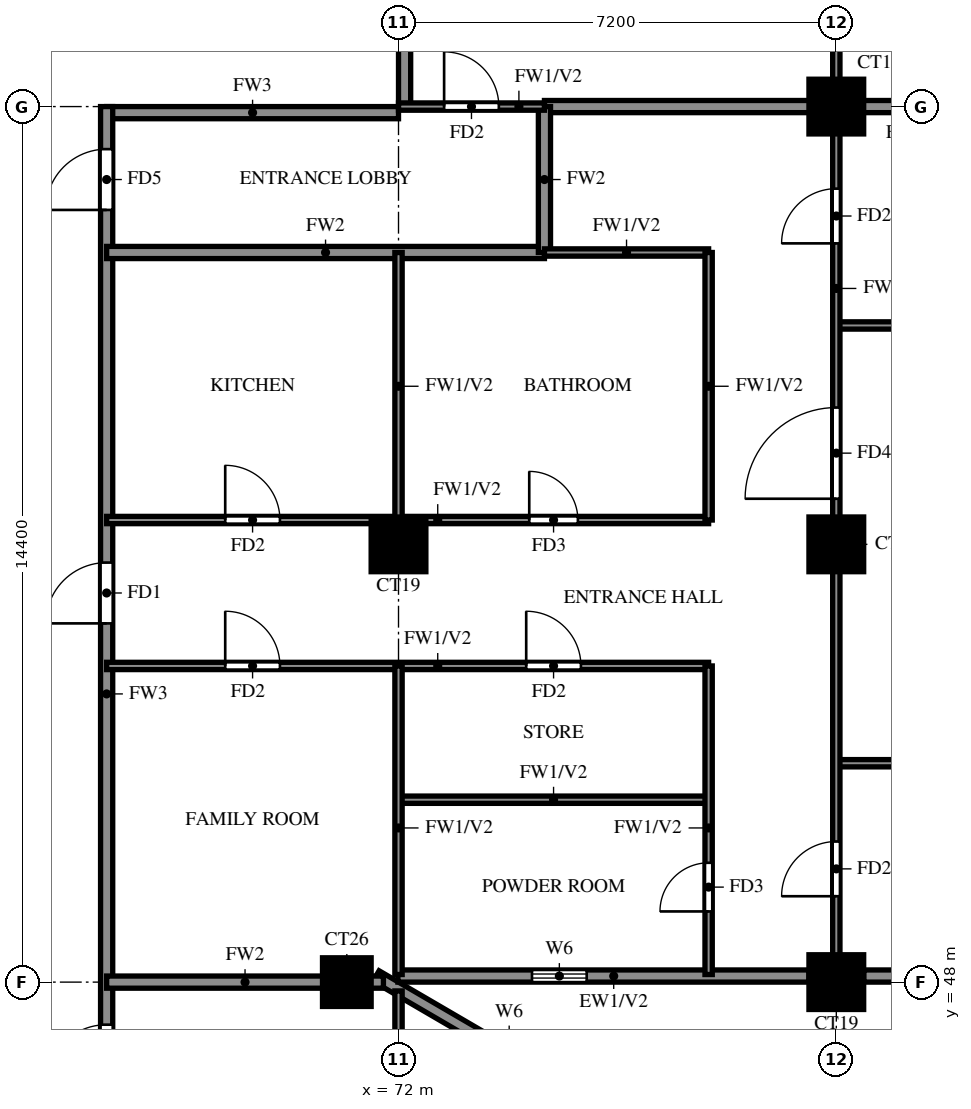
"""IFC4 building model, lengths in metres.
Left out: names, types, materials, properties, quantities, classifications, styles, units other than length and angle.
Written with IfcOpenShell. Run it as: python <this file> out.ifc"""

import sys

from ifc_helpers import new_model, si_unit, direction, frame, frame_2d, origin, origin_2d, place, context, subcontext, project, spatial, rectangle, extrude, source, transform, mapped, element, fill, save


model = new_model("IFC4")
c1 = context("Model", 3, precision=1e-05, world=origin(), true_north=direction((0.0, 1.0)))
c2 = subcontext(c1, "Body", "Model", "MODEL_VIEW")
j1 = project(units=[si_unit("LENGTHUNIT", "METRE"), si_unit("PLANEANGLEUNIT", "RADIAN")], contexts=[c1])
p1 = place(None, origin())
s1 = spatial("IfcSite", under=j1, at=p1, CompositionType="ELEMENT")
p2 = place(p1, origin())
s2 = spatial("IfcBuilding", under=s1, at=p2, CompositionType="ELEMENT")
p3 = place(p2, frame((0.0, 0.0, 192.0)))
s3 = spatial("IfcBuildingStorey", under=s2, at=p3, CompositionType="ELEMENT", Elevation=192.0)
m1 = source(origin(), c2, "Body", "SweptSolid", [
    extrude(rectangle(XDim=0.8, YDim=0.8, at=origin_2d()), origin(), (0.0, 0.0, 1.0), 3.2),
])
p4 = place(p3, frame((71.15, 48.0, 0.0), z_axis=(0.0, 0.0, 1.0), x_axis=(1.0, 0.0, 0.0)))
e1 = element("IfcColumn", 1, at=p4, inside=s3, PredefinedType="COLUMN", context=c2, shape_type="MappedRepresentation", body=[
    mapped(m1, transform((0.0, 0.0, 0.0))),
])
m2 = source(origin(), c2, "Body", "SweptSolid", [
    extrude(rectangle(XDim=0.9, YDim=0.9, at=origin_2d()), origin(), (0.0, 0.0, 1.0), 3.2),
])
for number, where, z_axis, x_axis in (
    (2, (79.2, 48.0, 0.0), (0.0, 0.0, 1.0), (1.0, 0.0, 0.0)),
    (3, (72.0, 55.2, 0.0), (0.0, 0.0, 1.0), (1.0, 0.0, 0.0)),
    (4, (79.2, 55.2, 0.0), (0.0, 0.0, 1.0), (1.0, 0.0, 0.0)),
    (5, (79.2, 62.4, 0.0), (0.0, 0.0, 1.0), (1.0, 0.0, 0.0)),
):
    element("IfcColumn", number, at=place(p3, frame(where, z_axis=z_axis, x_axis=x_axis)), inside=s3, PredefinedType="COLUMN", context=c2, shape_type="MappedRepresentation", body=[
        mapped(m2, transform((0.0, 0.0, 0.0))),
    ])
p5 = place(p3, frame((85.719, 39.881, 0.0), z_axis=(0.0, 0.0, 1.0), x_axis=(-0.86377618652, 0.503875678716, 0.0)))
e6 = element("IfcWall", 6, at=p5, inside=s3, PredefinedType="SOLIDWALL", context=c2, shape_type="SweptSolid", body=[
    extrude(rectangle(XDim=16.311, YDim=0.2, at=frame_2d((8.156, 0.0))), origin(), (0.0, 0.0, 1.0), 3.2),
])
p6 = place(p5, frame((13.326, 0.0, 1.5)))
e7 = element("IfcOpeningElement", 7, at=p6, cuts=e6, PredefinedType="OPENING", context=c2, shape_type="SweptSolid", body=[
    extrude(rectangle(XDim=0.9, YDim=0.9, at=frame_2d((0.45, 0.45))), frame((0.0, 0.11, 0.0), z_axis=(0.0, -1.0, 0.0), x_axis=(1.0, 0.0, 0.0)), (0.0, 0.0, 1.0), 0.22),
])
p7 = place(p3, frame((71.99, 48.1, 0.0), z_axis=(0.0, 0.0, 1.0), x_axis=(1.0, 0.0, 0.0)))
e8 = element("IfcWall", 8, at=p7, inside=s3, PredefinedType="SOLIDWALL", context=c2, shape_type="SweptSolid", body=[
    extrude(rectangle(XDim=6.76, YDim=0.2, at=frame_2d((3.38, 0.0))), origin(), (0.0, 0.0, 1.0), 3.2),
])
p8 = place(p7, frame((2.205, 0.0, 1.5)))
e9 = element("IfcOpeningElement", 9, at=p8, cuts=e8, PredefinedType="OPENING", context=c2, shape_type="SweptSolid", body=[
    extrude(rectangle(XDim=0.9, YDim=0.9, at=frame_2d((0.45, 0.45))), frame((0.0, 0.11, 0.0), z_axis=(0.0, -1.0, 0.0), x_axis=(1.0, 0.0, 0.0)), (0.0, 0.0, 1.0), 0.22),
])
p9 = place(p3, frame((79.65, 48.1, 0.0), z_axis=(0.0, 0.0, 1.0), x_axis=(1.0, 0.0, 0.0)))
e10 = element("IfcWall", 10, at=p9, inside=s3, PredefinedType="SOLIDWALL", context=c2, shape_type="SweptSolid", body=[
    extrude(rectangle(XDim=5.75, YDim=0.2, at=frame_2d((2.875, 0.0))), origin(), (0.0, 0.0, 1.0), 3.2),
])
p10 = place(p9, frame((1.675, 0.0, 0.6)))
e11 = element("IfcOpeningElement", 11, at=p10, cuts=e10, PredefinedType="OPENING", context=c2, shape_type="SweptSolid", body=[
    extrude(rectangle(XDim=2.4, YDim=2.4, at=frame_2d((1.2, 1.2))), frame((0.0, 0.11, 0.0), z_axis=(0.0, -1.0, 0.0), x_axis=(1.0, 0.0, 0.0)), (0.0, 0.0, 1.0), 0.22),
])
p11 = place(p3, frame((67.2, 62.3, 0.0), z_axis=(0.0, 0.0, 1.0), x_axis=(1.0, 0.0, 0.0)))
e12 = element("IfcWall", 12, at=p11, inside=s3, PredefinedType="SOLIDWALL", context=c2, shape_type="SweptSolid", body=[
    extrude(rectangle(XDim=4.8, YDim=0.2, at=frame_2d((2.4, 0.0))), origin(), (0.0, 0.0, 1.0), 3.2),
])
p12 = place(p3, frame((67.2, 45.6, 0.0), z_axis=(0.0, 0.0, 1.0), x_axis=(0.0, 1.0, 0.0)))
e13 = element("IfcWall", 13, at=p12, inside=s3, PredefinedType="SOLIDWALL", context=c2, shape_type="SweptSolid", body=[
    extrude(rectangle(XDim=16.8, YDim=0.2, at=frame_2d((8.4, 0.0))), origin(), (0.0, 0.0, 1.0), 3.2),
])
p13 = place(p12, frame((8.3, 0.0, 0.0)))
e14 = element("IfcOpeningElement", 14, at=p13, cuts=e13, PredefinedType="OPENING", context=c2, shape_type="SweptSolid", body=[
    extrude(rectangle(XDim=1.0, YDim=2.1, at=frame_2d((0.5, 1.05))), frame((0.0, 0.11, 0.0), z_axis=(0.0, -1.0, 0.0), x_axis=(1.0, 0.0, 0.0)), (0.0, 0.0, 1.0), 0.22),
])
p14 = place(p12, frame((15.1, 0.0, 0.0)))
e15 = element("IfcOpeningElement", 15, at=p14, cuts=e13, PredefinedType="OPENING", context=c2, shape_type="SweptSolid", body=[
    extrude(rectangle(XDim=1.0, YDim=2.1, at=frame_2d((0.5, 1.05))), frame((0.0, 0.11, 0.0), z_axis=(0.0, -1.0, 0.0), x_axis=(1.0, 0.0, 0.0)), (0.0, 0.0, 1.0), 0.22),
])
p15 = place(p12, frame((0.7, 0.0, 0.0)))
e16 = element("IfcOpeningElement", 16, at=p15, cuts=e13, PredefinedType="OPENING", context=c2, shape_type="SweptSolid", body=[
    extrude(rectangle(XDim=1.0, YDim=2.1, at=frame_2d((0.5, 1.05))), frame((0.0, 0.11, 0.0), z_axis=(0.0, -1.0, 0.0), x_axis=(1.0, 0.0, 0.0)), (0.0, 0.0, 1.0), 0.22),
])
p16 = place(p3, frame((72.1, 62.4, 0.0), z_axis=(0.0, 0.0, 1.0), x_axis=(0.0, 1.0, 0.0)))
e17 = element("IfcWall", 17, at=p16, inside=s3, PredefinedType="SOLIDWALL", context=c2, shape_type="SweptSolid", body=[
    extrude(rectangle(XDim=15.6, YDim=0.2, at=frame_2d((7.8, 0.0))), origin(), (0.0, 0.0, 1.0), 3.2),
])
p17 = place(p3, frame((67.2, 48.0, 0.0), z_axis=(0.0, 0.0, 1.0), x_axis=(1.0, 0.0, 0.0)))
e18 = element("IfcWall", 18, at=p17, inside=s3, PredefinedType="SOLIDWALL", context=c2, shape_type="SweptSolid", body=[
    extrude(rectangle(XDim=4.552, YDim=0.2, at=frame_2d((2.276, 0.0))), origin(), (0.0, 0.0, 1.0), 3.2),
])
p18 = place(p3, frame((67.2, 60.0, 0.0), z_axis=(0.0, 0.0, 1.0), x_axis=(1.0, 0.0, 0.0)))
e19 = element("IfcWall", 19, at=p18, inside=s3, PredefinedType="SOLIDWALL", context=c2, shape_type="SweptSolid", body=[
    extrude(rectangle(XDim=7.2, YDim=0.2, at=frame_2d((3.6, 0.0))), origin(), (0.0, 0.0, 1.0), 3.2),
])
p19 = place(p3, frame((74.4, 62.4, 0.0), z_axis=(0.0, 0.0, 1.0), x_axis=(1.0, 0.0, 0.0)))
e20 = element("IfcWall", 20, at=p19, inside=s3, PredefinedType="SOLIDWALL", context=c2, shape_type="SweptSolid", body=[
    extrude(rectangle(XDim=11.875, YDim=0.2, at=frame_2d((5.938, 0.0))), origin(), (0.0, 0.0, 1.0), 3.2),
])
p20 = place(p3, frame((74.4, 60.0, 0.0), z_axis=(0.0, 0.0, 1.0), x_axis=(0.0, 1.0, 0.0)))
e21 = element("IfcWall", 21, at=p20, inside=s3, PredefinedType="SOLIDWALL", context=c2, shape_type="SweptSolid", body=[
    extrude(rectangle(XDim=2.4, YDim=0.2, at=frame_2d((1.2, 0.0))), origin(), (0.0, 0.0, 1.0), 3.2),
])
p21 = place(p3, frame((72.0, 51.0, 0.0), z_axis=(0.0, 0.0, 1.0), x_axis=(1.0, 0.0, 0.0)))
e22 = element("IfcWall", 22, at=p21, inside=s3, PredefinedType="PARTITIONING", context=c2, shape_type="SweptSolid", body=[
    extrude(rectangle(XDim=5.1, YDim=0.12, at=frame_2d((2.55, 0.0))), origin(), (0.0, 0.0, 1.0), 3.2),
])
p22 = place(p3, frame((79.2, 51.6, 0.0), z_axis=(0.0, 0.0, 1.0), x_axis=(1.0, 0.0, 0.0)))
e23 = element("IfcWall", 23, at=p22, inside=s3, PredefinedType="PARTITIONING", context=c2, shape_type="SweptSolid", body=[
    extrude(rectangle(XDim=7.075, YDim=0.12, at=frame_2d((3.538, 0.0))), origin(), (0.0, 0.0, 1.0), 2.3),
])
p23 = place(p3, frame((67.2, 53.2, 0.0), z_axis=(0.0, 0.0, 1.0), x_axis=(1.0, 0.0, 0.0)))
e24 = element("IfcWall", 24, at=p23, inside=s3, PredefinedType="PARTITIONING", context=c2, shape_type="SweptSolid", body=[
    extrude(rectangle(XDim=9.9, YDim=0.12, at=frame_2d((4.95, 0.0))), origin(), (0.0, 0.0, 1.0), 3.2),
])
p24 = place(p23, frame((6.9, 0.0, 0.0)))
e25 = element("IfcOpeningElement", 25, at=p24, cuts=e24, PredefinedType="OPENING", context=c2, shape_type="SweptSolid", body=[
    extrude(rectangle(XDim=0.9, YDim=2.1, at=frame_2d((0.45, 1.05))), frame((0.0, 0.07, 0.0), z_axis=(0.0, -1.0, 0.0), x_axis=(1.0, 0.0, 0.0)), (0.0, 0.0, 1.0), 0.14),
])
p25 = place(p23, frame((1.95, 0.0, 0.0)))
e26 = element("IfcOpeningElement", 26, at=p25, cuts=e24, PredefinedType="OPENING", context=c2, shape_type="SweptSolid", body=[
    extrude(rectangle(XDim=0.9, YDim=2.1, at=frame_2d((0.45, 1.05))), frame((0.0, 0.07, 0.0), z_axis=(0.0, -1.0, 0.0), x_axis=(1.0, 0.0, 0.0)), (0.0, 0.0, 1.0), 0.14),
])
p26 = place(p3, frame((67.2, 55.6, 0.0), z_axis=(0.0, 0.0, 1.0), x_axis=(1.0, 0.0, 0.0)))
e27 = element("IfcWall", 27, at=p26, inside=s3, PredefinedType="PARTITIONING", context=c2, shape_type="SweptSolid", body=[
    extrude(rectangle(XDim=9.9, YDim=0.12, at=frame_2d((4.95, 0.0))), origin(), (0.0, 0.0, 1.0), 3.2),
])
p27 = place(p26, frame((6.95, 0.0, 0.0)))
e28 = element("IfcOpeningElement", 28, at=p27, cuts=e27, PredefinedType="OPENING", context=c2, shape_type="SweptSolid", body=[
    extrude(rectangle(XDim=0.8, YDim=2.1, at=frame_2d((0.4, 1.05))), frame((0.0, 0.07, 0.0), z_axis=(0.0, -1.0, 0.0), x_axis=(1.0, 0.0, 0.0)), (0.0, 0.0, 1.0), 0.14),
])
p28 = place(p26, frame((1.95, 0.0, 0.0)))
e29 = element("IfcOpeningElement", 29, at=p28, cuts=e27, PredefinedType="OPENING", context=c2, shape_type="SweptSolid", body=[
    extrude(rectangle(XDim=0.9, YDim=2.1, at=frame_2d((0.45, 1.05))), frame((0.0, 0.07, 0.0), z_axis=(0.0, -1.0, 0.0), x_axis=(1.0, 0.0, 0.0)), (0.0, 0.0, 1.0), 0.14),
])
p29 = place(p3, frame((79.2, 58.8, 0.0), z_axis=(0.0, 0.0, 1.0), x_axis=(1.0, 0.0, 0.0)))
e30 = element("IfcWall", 30, at=p29, inside=s3, PredefinedType="PARTITIONING", context=c2, shape_type="SweptSolid", body=[
    extrude(rectangle(XDim=7.075, YDim=0.12, at=frame_2d((3.538, 0.0))), origin(), (0.0, 0.0, 1.0), 2.3),
])
p30 = place(p3, frame((74.4, 60.0, 0.0), z_axis=(0.0, 0.0, 1.0), x_axis=(1.0, 0.0, 0.0)))
e31 = element("IfcWall", 31, at=p30, inside=s3, PredefinedType="PARTITIONING", context=c2, shape_type="SweptSolid", body=[
    extrude(rectangle(XDim=2.7, YDim=0.12, at=frame_2d((1.35, 0.0))), origin(), (0.0, 0.0, 1.0), 3.2),
])
p31 = place(p3, frame((72.0, 62.4, 0.0), z_axis=(0.0, 0.0, 1.0), x_axis=(1.0, 0.0, 0.0)))
e32 = element("IfcWall", 32, at=p31, inside=s3, PredefinedType="PARTITIONING", context=c2, shape_type="SweptSolid", body=[
    extrude(rectangle(XDim=2.4, YDim=0.12, at=frame_2d((1.2, 0.0))), origin(), (0.0, 0.0, 1.0), 3.2),
])
p32 = place(p31, frame((0.75, 0.0, 0.0)))
e33 = element("IfcOpeningElement", 33, at=p32, cuts=e32, PredefinedType="OPENING", context=c2, shape_type="SweptSolid", body=[
    extrude(rectangle(XDim=0.9, YDim=2.1, at=frame_2d((0.45, 1.05))), frame((0.0, 0.07, 0.0), z_axis=(0.0, -1.0, 0.0), x_axis=(1.0, 0.0, 0.0)), (0.0, 0.0, 1.0), 0.14),
])
p33 = place(p3, frame((72.0, 39.725, 0.0), z_axis=(0.0, 0.0, 1.0), x_axis=(0.0, 1.0, 0.0)))
e34 = element("IfcWall", 34, at=p33, inside=s3, PredefinedType="PARTITIONING", context=c2, shape_type="SweptSolid", body=[
    extrude(rectangle(XDim=8.13, YDim=0.12, at=frame_2d((4.065, 0.0))), origin(), (0.0, 0.0, 1.0), 2.3),
])
p34 = place(p33, frame((1.788, 0.0, 0.0)))
e35 = element("IfcOpeningElement", 35, at=p34, cuts=e34, PredefinedType="OPENING", context=c2, shape_type="SweptSolid", body=[
    extrude(rectangle(XDim=1.5, YDim=2.1, at=frame_2d((0.75, 1.05))), frame((0.0, 0.07, 0.0), z_axis=(0.0, -1.0, 0.0), x_axis=(1.0, 0.0, 0.0)), (0.0, 0.0, 1.0), 0.14),
])
p35 = place(p33, frame((4.575, 0.0, 0.0)))
e36 = element("IfcOpeningElement", 36, at=p35, cuts=e34, PredefinedType="OPENING", context=c2, shape_type="SweptSolid", body=[
    extrude(rectangle(XDim=0.8, YDim=2.1, at=frame_2d((0.4, 1.05))), frame((0.0, 0.07, 0.0), z_axis=(0.0, -1.0, 0.0), x_axis=(1.0, 0.0, 0.0)), (0.0, 0.0, 1.0), 0.14),
])
p36 = place(p3, frame((72.0, 48.125, 0.0), z_axis=(0.0, 0.0, 1.0), x_axis=(0.0, 1.0, 0.0)))
e37 = element("IfcWall", 37, at=p36, inside=s3, PredefinedType="PARTITIONING", context=c2, shape_type="SweptSolid", body=[
    extrude(rectangle(XDim=5.075, YDim=0.12, at=frame_2d((2.538, 0.0))), origin(), (0.0, 0.0, 1.0), 3.2),
])
p37 = place(p3, frame((72.0, 55.6, 0.0), z_axis=(0.0, 0.0, 1.0), x_axis=(0.0, 1.0, 0.0)))
e38 = element("IfcWall", 38, at=p37, inside=s3, PredefinedType="PARTITIONING", context=c2, shape_type="SweptSolid", body=[
    extrude(rectangle(XDim=4.4, YDim=0.12, at=frame_2d((2.2, 0.0))), origin(), (0.0, 0.0, 1.0), 3.2),
])
p38 = place(p3, frame((77.1, 48.125, 0.0), z_axis=(0.0, 0.0, 1.0), x_axis=(0.0, 1.0, 0.0)))
e39 = element("IfcWall", 39, at=p38, inside=s3, PredefinedType="PARTITIONING", context=c2, shape_type="SweptSolid", body=[
    extrude(rectangle(XDim=5.075, YDim=0.12, at=frame_2d((2.538, 0.0))), origin(), (0.0, 0.0, 1.0), 3.2),
])
p39 = place(p38, frame((1.038, 0.0, 0.0)))
e40 = element("IfcOpeningElement", 40, at=p39, cuts=e39, PredefinedType="OPENING", context=c2, shape_type="SweptSolid", body=[
    extrude(rectangle(XDim=0.8, YDim=2.1, at=frame_2d((0.4, 1.05))), frame((0.0, 0.07, 0.0), z_axis=(0.0, -1.0, 0.0), x_axis=(1.0, 0.0, 0.0)), (0.0, 0.0, 1.0), 0.14),
])
p40 = place(p3, frame((77.1, 55.6, 0.0), z_axis=(0.0, 0.0, 1.0), x_axis=(0.0, 1.0, 0.0)))
e41 = element("IfcWall", 41, at=p40, inside=s3, PredefinedType="PARTITIONING", context=c2, shape_type="SweptSolid", body=[
    extrude(rectangle(XDim=4.4, YDim=0.12, at=frame_2d((2.2, 0.0))), origin(), (0.0, 0.0, 1.0), 3.2),
])
p41 = place(p3, frame((79.2, 48.125, 0.0), z_axis=(0.0, 0.0, 1.0), x_axis=(0.0, 1.0, 0.0)))
e42 = element("IfcWall", 42, at=p41, inside=s3, PredefinedType="PARTITIONING", context=c2, shape_type="SweptSolid", body=[
    extrude(rectangle(XDim=25.075, YDim=0.12, at=frame_2d((12.538, 0.0))), origin(), (0.0, 0.0, 1.0), 3.2),
])
p42 = place(p41, frame((1.288, 0.0, 0.0)))
e43 = element("IfcOpeningElement", 43, at=p42, cuts=e42, PredefinedType="OPENING", context=c2, shape_type="SweptSolid", body=[
    extrude(rectangle(XDim=0.9, YDim=2.1, at=frame_2d((0.45, 1.05))), frame((0.0, 0.07, 0.0), z_axis=(0.0, -1.0, 0.0), x_axis=(1.0, 0.0, 0.0)), (0.0, 0.0, 1.0), 0.14),
])
p43 = place(p41, frame((7.825, 0.0, 0.0)))
e44 = element("IfcOpeningElement", 44, at=p43, cuts=e42, PredefinedType="OPENING", context=c2, shape_type="SweptSolid", body=[
    extrude(rectangle(XDim=1.5, YDim=2.1, at=frame_2d((0.75, 1.05))), frame((0.0, 0.07, 0.0), z_axis=(0.0, -1.0, 0.0), x_axis=(1.0, 0.0, 0.0)), (0.0, 0.0, 1.0), 0.14),
])
p44 = place(p41, frame((12.025, 0.0, 0.0)))
e45 = element("IfcOpeningElement", 45, at=p44, cuts=e42, PredefinedType="OPENING", context=c2, shape_type="SweptSolid", body=[
    extrude(rectangle(XDim=0.9, YDim=2.1, at=frame_2d((0.45, 1.05))), frame((0.0, 0.07, 0.0), z_axis=(0.0, -1.0, 0.0), x_axis=(1.0, 0.0, 0.0)), (0.0, 0.0, 1.0), 0.14),
])
p45 = place(p41, frame((15.625, 0.0, 0.0)))
e46 = element("IfcOpeningElement", 46, at=p45, cuts=e42, PredefinedType="OPENING", context=c2, shape_type="SweptSolid", body=[
    extrude(rectangle(XDim=0.9, YDim=2.1, at=frame_2d((0.45, 1.05))), frame((0.0, 0.07, 0.0), z_axis=(0.0, -1.0, 0.0), x_axis=(1.0, 0.0, 0.0)), (0.0, 0.0, 1.0), 0.14),
])
p46 = place(p41, frame((19.225, 0.0, 0.0)))
e47 = element("IfcOpeningElement", 47, at=p46, cuts=e42, PredefinedType="OPENING", context=c2, shape_type="SweptSolid", body=[
    extrude(rectangle(XDim=0.9, YDim=2.1, at=frame_2d((0.45, 1.05))), frame((0.0, 0.07, 0.0), z_axis=(0.0, -1.0, 0.0), x_axis=(1.0, 0.0, 0.0)), (0.0, 0.0, 1.0), 0.14),
])
p47 = place(p41, frame((22.825, 0.0, 0.0)))
e48 = element("IfcOpeningElement", 48, at=p47, cuts=e42, PredefinedType="OPENING", context=c2, shape_type="SweptSolid", body=[
    extrude(rectangle(XDim=0.9, YDim=2.1, at=frame_2d((0.45, 1.05))), frame((0.0, 0.07, 0.0), z_axis=(0.0, -1.0, 0.0), x_axis=(1.0, 0.0, 0.0)), (0.0, 0.0, 1.0), 0.14),
])
p48 = place(p8, origin())
e49 = element("IfcWindow", 49, at=p48, inside=s3, PartitioningType="SINGLE_PANEL", PredefinedType="WINDOW", context=c2, shape_type="SweptSolid", body=[
    extrude(rectangle(XDim=0.9, YDim=0.9, at=frame_2d((0.45, 0.45))), frame((0.0, 0.03, 0.0), z_axis=(0.0, -1.0, 0.0), x_axis=(1.0, 0.0, 0.0)), (0.0, 0.0, 1.0), 0.06),
])
fill(e9, e49)
p49 = place(p13, origin())
e50 = element("IfcDoor", 50, at=p49, inside=s3, OperationType="SINGLE_SWING_LEFT", PredefinedType="DOOR", context=c2, shape_type="SweptSolid", body=[
    extrude(rectangle(XDim=1.0, YDim=2.1, at=frame_2d((0.5, 1.05))), frame((0.0, 0.025, 0.0), z_axis=(0.0, -1.0, 0.0), x_axis=(1.0, 0.0, 0.0)), (0.0, 0.0, 1.0), 0.05),
])
fill(e14, e50)
p50 = place(p42, origin())
e51 = element("IfcDoor", 51, at=p50, inside=s3, OperationType="SINGLE_SWING_RIGHT", PredefinedType="DOOR", context=c2, shape_type="SweptSolid", body=[
    extrude(rectangle(XDim=0.9, YDim=2.1, at=frame_2d((0.45, 1.05))), frame((0.0, 0.025, 0.0), z_axis=(0.0, -1.0, 0.0), x_axis=(1.0, 0.0, 0.0)), (0.0, 0.0, 1.0), 0.05),
])
fill(e43, e51)
p51 = place(p43, origin())
e52 = element("IfcDoor", 52, at=p51, inside=s3, OperationType="SINGLE_SWING_RIGHT", PredefinedType="DOOR", context=c2, shape_type="SweptSolid", body=[
    extrude(rectangle(XDim=1.5, YDim=2.1, at=frame_2d((0.75, 1.05))), frame((0.0, 0.025, 0.0), z_axis=(0.0, -1.0, 0.0), x_axis=(1.0, 0.0, 0.0)), (0.0, 0.0, 1.0), 0.05),
])
fill(e44, e52)
p52 = place(p44, origin())
e53 = element("IfcDoor", 53, at=p52, inside=s3, OperationType="SINGLE_SWING_LEFT", PredefinedType="DOOR", context=c2, shape_type="SweptSolid", body=[
    extrude(rectangle(XDim=0.9, YDim=2.1, at=frame_2d((0.45, 1.05))), frame((0.0, 0.025, 0.0), z_axis=(0.0, -1.0, 0.0), x_axis=(1.0, 0.0, 0.0)), (0.0, 0.0, 1.0), 0.05),
])
fill(e45, e53)
p53 = place(p39, origin())
e54 = element("IfcDoor", 54, at=p53, inside=s3, OperationType="SINGLE_SWING_RIGHT", PredefinedType="DOOR", context=c2, shape_type="SweptSolid", body=[
    extrude(rectangle(XDim=0.8, YDim=2.1, at=frame_2d((0.4, 1.05))), frame((0.0, 0.025, 0.0), z_axis=(0.0, -1.0, 0.0), x_axis=(1.0, 0.0, 0.0)), (0.0, 0.0, 1.0), 0.05),
])
fill(e40, e54)
p54 = place(p24, origin())
e55 = element("IfcDoor", 55, at=p54, inside=s3, OperationType="SINGLE_SWING_LEFT", PredefinedType="DOOR", context=c2, shape_type="SweptSolid", body=[
    extrude(rectangle(XDim=0.9, YDim=2.1, at=frame_2d((0.45, 1.05))), frame((0.0, 0.025, 0.0), z_axis=(0.0, -1.0, 0.0), x_axis=(1.0, 0.0, 0.0)), (0.0, 0.0, 1.0), 0.05),
])
fill(e25, e55)
p55 = place(p27, origin())
e56 = element("IfcDoor", 56, at=p55, inside=s3, OperationType="SINGLE_SWING_LEFT", PredefinedType="DOOR", context=c2, shape_type="SweptSolid", body=[
    extrude(rectangle(XDim=0.8, YDim=2.1, at=frame_2d((0.4, 1.05))), frame((0.0, 0.025, 0.0), z_axis=(0.0, -1.0, 0.0), x_axis=(1.0, 0.0, 0.0)), (0.0, 0.0, 1.0), 0.05),
])
fill(e28, e56)
p56 = place(p25, origin())
e57 = element("IfcDoor", 57, at=p56, inside=s3, OperationType="SINGLE_SWING_RIGHT", PredefinedType="DOOR", context=c2, shape_type="SweptSolid", body=[
    extrude(rectangle(XDim=0.9, YDim=2.1, at=frame_2d((0.45, 1.05))), frame((0.0, 0.025, 0.0), z_axis=(0.0, -1.0, 0.0), x_axis=(1.0, 0.0, 0.0)), (0.0, 0.0, 1.0), 0.05),
])
fill(e26, e57)
p57 = place(p28, origin())
e58 = element("IfcDoor", 58, at=p57, inside=s3, OperationType="SINGLE_SWING_LEFT", PredefinedType="DOOR", context=c2, shape_type="SweptSolid", body=[
    extrude(rectangle(XDim=0.9, YDim=2.1, at=frame_2d((0.45, 1.05))), frame((0.0, 0.025, 0.0), z_axis=(0.0, -1.0, 0.0), x_axis=(1.0, 0.0, 0.0)), (0.0, 0.0, 1.0), 0.05),
])
fill(e29, e58)
p58 = place(p32, origin())
e59 = element("IfcDoor", 59, at=p58, inside=s3, OperationType="SINGLE_SWING_RIGHT", PredefinedType="DOOR", context=c2, shape_type="SweptSolid", body=[
    extrude(rectangle(XDim=0.9, YDim=2.1, at=frame_2d((0.45, 1.05))), frame((0.0, 0.025, 0.0), z_axis=(0.0, -1.0, 0.0), x_axis=(1.0, 0.0, 0.0)), (0.0, 0.0, 1.0), 0.05),
])
fill(e33, e59)
p59 = place(p14, origin())
e60 = element("IfcDoor", 60, at=p59, inside=s3, OperationType="SINGLE_SWING_LEFT", PredefinedType="DOOR", context=c2, shape_type="SweptSolid", body=[
    extrude(rectangle(XDim=1.0, YDim=2.1, at=frame_2d((0.5, 1.05))), frame((0.0, 0.025, 0.0), z_axis=(0.0, -1.0, 0.0), x_axis=(1.0, 0.0, 0.0)), (0.0, 0.0, 1.0), 0.05),
])
fill(e15, e60)
p60 = place(p15, origin())
e61 = element("IfcDoor", 61, at=p60, inside=s3, OperationType="SINGLE_SWING_LEFT", PredefinedType="DOOR", context=c2, shape_type="SweptSolid", body=[
    extrude(rectangle(XDim=1.0, YDim=2.1, at=frame_2d((0.5, 1.05))), frame((0.0, 0.025, 0.0), z_axis=(0.0, -1.0, 0.0), x_axis=(1.0, 0.0, 0.0)), (0.0, 0.0, 1.0), 0.05),
])
fill(e16, e61)
save(model, sys.argv[1])
